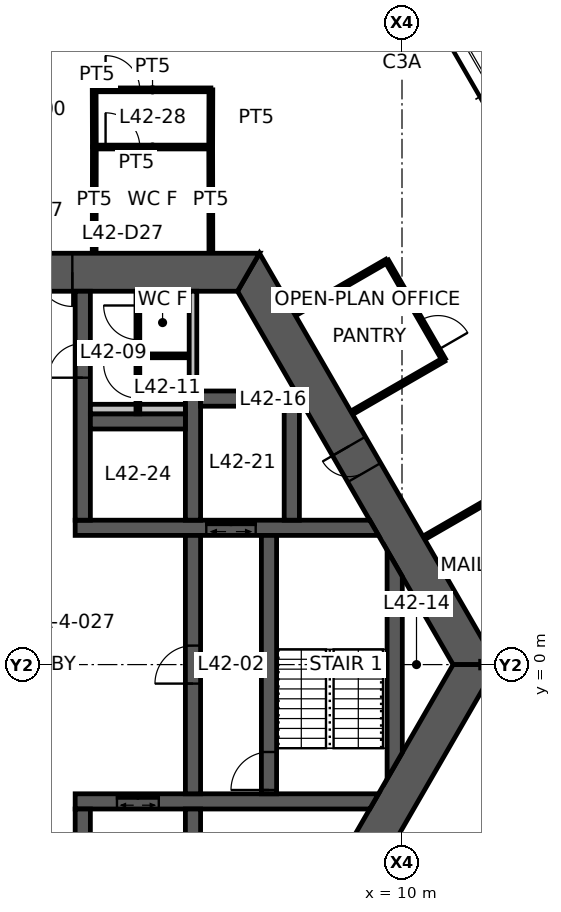
"""IFC4 building model, lengths in metres.
Left out: names, types, materials, properties, quantities, classifications, styles, units other than length and angle.
Written with IfcOpenShell. Run it as: python <this file> out.ifc"""

import sys

from ifc_helpers import new_model, si_unit, direction, frame, frame_2d, origin, place, context, subcontext, project, spatial, polyline, rectangle, outline, extrude, element, fill, save


model = new_model("IFC4")
c1 = context("Model", 3, precision=1e-05, world=origin(), true_north=direction((0.0, 1.0)))
c2 = subcontext(c1, "Body", "Model", "MODEL_VIEW")
j1 = project(units=[si_unit("LENGTHUNIT", "METRE"), si_unit("PLANEANGLEUNIT", "RADIAN")], contexts=[c1])
p1 = place(None, origin())
s1 = spatial("IfcSite", under=j1, at=p1, CompositionType="ELEMENT")
p2 = place(p1, origin())
s2 = spatial("IfcBuilding", under=s1, at=p2, CompositionType="ELEMENT")
p3 = place(p2, frame((0.0, 0.0, 168.2)))
s3 = spatial("IfcBuildingStorey", under=s2, at=p3, CompositionType="ELEMENT", Elevation=168.2)
p4 = place(p3, frame((11.922, 0.0, 0.0), z_axis=(0.0, 0.0, 1.0), x_axis=(-0.500004296715, 0.866022923061, 0.0)))
e1 = element("IfcWall", 1, at=p4, inside=s3, PredefinedType="SHEAR", context=c2, shape_type="SweptSolid", body=[
    extrude(outline(polyline([(-0.289, -0.5), (5.835, -0.5), (6.635, -0.5), (12.211, -0.5), (11.634, 0.5), (6.635, 0.5), (5.835, 0.5), (0.289, 0.5), (-0.289, -0.5)])), origin(), (0.0, 0.0, 1.0), 3.9),
])
p5 = place(p4, frame((5.835, 0.0, 0.0)))
e2 = element("IfcOpeningElement", 2, at=p5, cuts=e1, PredefinedType="OPENING", context=c2, shape_type="SweptSolid", body=[
    extrude(rectangle(XDim=0.8, YDim=2.1, at=frame_2d((0.4, 1.05))), frame((0.0, 0.51, 0.0), z_axis=(0.0, -1.0, 0.0), x_axis=(1.0, 0.0, 0.0)), (0.0, 0.0, 1.0), 1.02),
])
p6 = place(p3, frame((5.961, 10.325, 0.0), z_axis=(0.0, 0.0, 1.0), x_axis=(-1.0, 0.0, 0.0)))
e3 = element("IfcWall", 3, at=p6, inside=s3, PredefinedType="SHEAR", context=c2, shape_type="SweptSolid", body=[
    extrude(outline(polyline([(-0.289, -0.5), (4.636, -0.5), (5.536, -0.5), (6.386, -0.5), (7.286, -0.5), (12.211, -0.5), (11.634, 0.5), (7.286, 0.5), (6.386, 0.5), (5.536, 0.5), (4.636, 0.5), (0.289, 0.5), (-0.289, -0.5)])), origin(), (0.0, 0.0, 1.0), 3.9),
])
p7 = place(p6, frame((6.386, 0.0, 0.0)))
e4 = element("IfcOpeningElement", 4, at=p7, cuts=e3, PredefinedType="OPENING", context=c2, shape_type="SweptSolid", body=[
    extrude(rectangle(XDim=0.9, YDim=2.1, at=frame_2d((0.45, 1.05))), frame((0.0, 0.51, 0.0), z_axis=(0.0, -1.0, 0.0), x_axis=(1.0, 0.0, 0.0)), (0.0, 0.0, 1.0), 1.02),
])
p8 = place(p6, frame((4.636, 0.0, 0.0)))
e5 = element("IfcOpeningElement", 5, at=p8, cuts=e3, PredefinedType="OPENING", context=c2, shape_type="SweptSolid", body=[
    extrude(rectangle(XDim=0.9, YDim=2.1, at=frame_2d((0.45, 1.05))), frame((0.0, 0.51, 0.0), z_axis=(0.0, -1.0, 0.0), x_axis=(1.0, 0.0, 0.0)), (0.0, 0.0, 1.0), 1.02),
])
p9 = place(p3, frame((5.961, -10.325, 0.0), z_axis=(0.0, 0.0, 1.0), x_axis=(0.500004296715, 0.866022923061, 0.0)))
e6 = element("IfcWall", 6, at=p9, inside=s3, PredefinedType="SHEAR", context=c2, shape_type="SweptSolid", body=[
    extrude(outline(polyline([(-0.289, -0.5), (4.594, -0.5), (5.394, -0.5), (12.211, -0.5), (11.634, 0.5), (5.394, 0.5), (4.594, 0.5), (0.289, 0.5), (-0.289, -0.5)])), origin(), (0.0, 0.0, 1.0), 3.9),
])
p10 = place(p9, frame((4.594, 0.0, 0.0)))
e7 = element("IfcOpeningElement", 7, at=p10, cuts=e6, PredefinedType="OPENING", context=c2, shape_type="SweptSolid", body=[
    extrude(rectangle(XDim=0.8, YDim=2.1, at=frame_2d((0.4, 1.05))), frame((0.0, 0.51, 0.0), z_axis=(0.0, -1.0, 0.0), x_axis=(1.0, 0.0, 0.0)), (0.0, 0.0, 1.0), 1.02),
])
p11 = place(p3, frame((1.4, 3.6, 0.0), z_axis=(0.0, 0.0, 1.0), x_axis=(1.0, 0.0, 0.0)))
e8 = element("IfcWall", 8, at=p11, inside=s3, PredefinedType="SHEAR", context=c2, shape_type="SweptSolid", body=[
    extrude(outline(polyline([(0.0, -0.2), (3.45, -0.2), (4.75, -0.2), (7.982, -0.2), (7.751, 0.2), (4.75, 0.2), (3.45, 0.2), (0.0, 0.2), (0.0, -0.2)])), origin(), (0.0, 0.0, 1.0), 3.9),
])
p12 = place(p11, frame((3.45, 0.0, 0.0)))
e9 = element("IfcOpeningElement", 9, at=p12, cuts=e8, PredefinedType="OPENING", context=c2, shape_type="SweptSolid", body=[
    extrude(rectangle(XDim=1.3, YDim=2.1, at=frame_2d((0.65, 1.05))), frame((0.0, 0.21, 0.0), z_axis=(0.0, -1.0, 0.0), x_axis=(1.0, 0.0, 0.0)), (0.0, 0.0, 1.0), 0.42),
])
p13 = place(p3, frame((1.4, -3.6, 0.0), z_axis=(0.0, 0.0, 1.0), x_axis=(1.0, 0.0, 0.0)))
e10 = element("IfcWall", 10, at=p13, inside=s3, PredefinedType="SHEAR", context=c2, shape_type="SweptSolid", body=[
    extrude(outline(polyline([(0.0, -0.2), (1.1, -0.2), (2.2, -0.2), (7.751, -0.2), (7.982, 0.2), (2.2, 0.2), (1.1, 0.2), (0.0, 0.2), (0.0, -0.2)])), origin(), (0.0, 0.0, 1.0), 3.9),
])
p14 = place(p13, frame((1.1, 0.0, 0.0)))
e11 = element("IfcOpeningElement", 11, at=p14, cuts=e10, PredefinedType="OPENING", context=c2, shape_type="SweptSolid", body=[
    extrude(rectangle(XDim=1.1, YDim=2.1, at=frame_2d((0.55, 1.05))), frame((0.0, 0.21, 0.0), z_axis=(0.0, -1.0, 0.0), x_axis=(1.0, 0.0, 0.0)), (0.0, 0.0, 1.0), 0.42),
])
p15 = place(p3, frame((1.6, 3.8, 0.0), z_axis=(0.0, 0.0, 1.0), x_axis=(0.0, 1.0, 0.0)))
e12 = element("IfcWall", 12, at=p15, inside=s3, PredefinedType="SHEAR", context=c2, shape_type="SweptSolid", body=[
    extrude(rectangle(XDim=6.025, YDim=0.4, at=frame_2d((3.012, 0.0))), origin(), (0.0, 0.0, 1.0), 3.9),
])
p16 = place(p15, frame((3.75, 0.0, 0.0)))
e13 = element("IfcOpeningElement", 13, at=p16, cuts=e12, PredefinedType="OPENING", context=c2, shape_type="SweptSolid", body=[
    extrude(rectangle(XDim=0.9, YDim=2.1, at=frame_2d((0.45, 1.05))), frame((0.0, 0.21, 0.0), z_axis=(0.0, -1.0, 0.0), x_axis=(1.0, 0.0, 0.0)), (0.0, 0.0, 1.0), 0.42),
])
p17 = place(p3, frame((1.6, -3.8, 0.0), z_axis=(0.0, 0.0, 1.0), x_axis=(0.0, -1.0, 0.0)))
e14 = element("IfcWall", 14, at=p17, inside=s3, PredefinedType="SHEAR", context=c2, shape_type="SweptSolid", body=[
    extrude(rectangle(XDim=6.025, YDim=0.4, at=frame_2d((3.012, 0.0))), origin(), (0.0, 0.0, 1.0), 3.9),
])
p18 = place(p17, frame((3.6, 0.0, 0.0)))
e15 = element("IfcOpeningElement", 15, at=p18, cuts=e14, PredefinedType="OPENING", context=c2, shape_type="SweptSolid", body=[
    extrude(rectangle(XDim=1.2, YDim=2.1, at=frame_2d((0.6, 1.05))), frame((0.0, 0.21, 0.0), z_axis=(0.0, -1.0, 0.0), x_axis=(1.0, 0.0, 0.0)), (0.0, 0.0, 1.0), 0.42),
])
p19 = place(p3, frame((4.5, -3.4, 0.0), z_axis=(0.0, 0.0, 1.0), x_axis=(0.0, 1.0, 0.0)))
e16 = element("IfcWall", 16, at=p19, inside=s3, PredefinedType="SHEAR", context=c2, shape_type="SweptSolid", body=[
    extrude(rectangle(XDim=6.8, YDim=0.4, at=frame_2d((3.4, 0.0))), origin(), (0.0, 0.0, 1.0), 3.9),
])
p20 = place(p19, frame((2.9, 0.0, 0.0)))
e17 = element("IfcOpeningElement", 17, at=p20, cuts=e16, PredefinedType="OPENING", context=c2, shape_type="SweptSolid", body=[
    extrude(rectangle(XDim=1.0, YDim=2.1, at=frame_2d((0.5, 1.05))), frame((0.0, 0.21, 0.0), z_axis=(0.0, -1.0, 0.0), x_axis=(1.0, 0.0, 0.0)), (0.0, 0.0, 1.0), 0.42),
])
p21 = place(p3, frame((6.5, -3.4, 0.0), z_axis=(0.0, 0.0, 1.0), x_axis=(0.0, 1.0, 0.0)))
e18 = element("IfcWall", 18, at=p21, inside=s3, PredefinedType="SHEAR", context=c2, shape_type="SweptSolid", body=[
    extrude(rectangle(XDim=6.8, YDim=0.4, at=frame_2d((3.4, 0.0))), origin(), (0.0, 0.0, 1.0), 3.9),
])
p22 = place(p21, frame((0.1, 0.0, 0.0)))
e19 = element("IfcOpeningElement", 19, at=p22, cuts=e18, PredefinedType="OPENING", context=c2, shape_type="SweptSolid", body=[
    extrude(rectangle(XDim=1.0, YDim=2.1, at=frame_2d((0.5, 1.05))), frame((0.0, 0.21, 0.0), z_axis=(0.0, -1.0, 0.0), x_axis=(1.0, 0.0, 0.0)), (0.0, 0.0, 1.0), 0.42),
])
p23 = place(p3, frame((4.5, 3.8, 0.0), z_axis=(0.0, 0.0, 1.0), x_axis=(0.0, 1.0, 0.0)))
e20 = element("IfcWall", 20, at=p23, inside=s3, PredefinedType="SHEAR", context=c2, shape_type="SweptSolid", body=[
    extrude(rectangle(XDim=3.4, YDim=0.4, at=frame_2d((1.7, 0.0))), origin(), (0.0, 0.0, 1.0), 3.9),
])
p24 = place(p3, frame((4.5, -3.8, 0.0), z_axis=(0.0, 0.0, 1.0), x_axis=(0.0, -1.0, 0.0)))
e21 = element("IfcWall", 21, at=p24, inside=s3, PredefinedType="SHEAR", context=c2, shape_type="SweptSolid", body=[
    extrude(rectangle(XDim=6.025, YDim=0.4, at=frame_2d((3.012, 0.0))), origin(), (0.0, 0.0, 1.0), 3.9),
])
p25 = place(p3, frame((1.8, 6.4, 0.0), z_axis=(0.0, 0.0, 1.0), x_axis=(1.0, 0.0, 0.0)))
e22 = element("IfcWall", 22, at=p25, inside=s3, PredefinedType="SHEAR", context=c2, shape_type="SweptSolid", body=[
    extrude(rectangle(XDim=2.5, YDim=0.4, at=frame_2d((1.25, 0.0))), origin(), (0.0, 0.0, 1.0), 3.9),
])
p26 = place(p3, frame((4.7, 7.0, 0.0), z_axis=(0.0, 0.0, 1.0), x_axis=(1.0, 0.0, 0.0)))
e23 = element("IfcWall", 23, at=p26, inside=s3, PredefinedType="SHEAR", context=c2, shape_type="SweptSolid", body=[
    extrude(rectangle(XDim=2.2, YDim=0.4, at=frame_2d((1.1, 0.0))), origin(), (0.0, 0.0, 1.0), 3.9),
])
p27 = place(p3, frame((7.1, 3.8, 0.0), z_axis=(0.0, 0.0, 1.0), x_axis=(0.0, 1.0, 0.0)))
e24 = element("IfcWall", 24, at=p27, inside=s3, PredefinedType="SHEAR", context=c2, shape_type="SweptSolid", body=[
    extrude(outline(polyline([(0.0, -0.2), (3.206, -0.2), (3.4, 0.0), (3.4, 0.2), (0.0, 0.2), (0.0, -0.2)])), origin(), (0.0, 0.0, 1.0), 3.9),
])
p28 = place(p3, frame((9.808, -2.662, 0.0), z_axis=(0.0, 0.0, 1.0), x_axis=(0.0, 1.0, 0.0)))
e25 = element("IfcWall", 25, at=p28, inside=s3, PredefinedType="SHEAR", context=c2, shape_type="SweptSolid", body=[
    extrude(outline(polyline([(0.346, -0.2), (4.978, -0.2), (5.671, 0.2), (-0.346, 0.2), (0.346, -0.2)])), origin(), (0.0, 0.0, 1.0), 3.9),
])
p29 = place(p3, frame((4.5, 7.2, 0.0), z_axis=(0.0, 0.0, 1.0), x_axis=(0.0, 1.0, 0.0)))
e26 = element("IfcWall", 26, at=p29, inside=s3, PredefinedType="STANDARD", context=c2, shape_type="SweptSolid", body=[
    extrude(rectangle(XDim=2.625, YDim=0.2, at=frame_2d((1.312, 0.0))), origin(), (0.0, 0.0, 1.0), 3.9),
])
p30 = place(p3, frame((1.8, 6.725, 0.0), z_axis=(0.0, 0.0, 1.0), x_axis=(1.0, 0.0, 0.0)))
e27 = element("IfcWall", 27, at=p30, inside=s3, PredefinedType="PLUMBINGWALL", context=c2, shape_type="SweptSolid", body=[
    extrude(rectangle(XDim=2.5, YDim=0.25, at=frame_2d((1.25, 0.0))), origin(), (0.0, 0.0, 1.0), 3.9),
])
p31 = place(p3, frame((3.05, 6.6, 0.0), z_axis=(0.0, 0.0, 1.0), x_axis=(0.0, 1.0, 0.0)))
e28 = element("IfcWall", 28, at=p31, inside=s3, PredefinedType="PARTITIONING", context=c2, shape_type="SweptSolid", body=[
    extrude(rectangle(XDim=3.225, YDim=0.1, at=frame_2d((1.612, 0.0))), origin(), (0.0, 0.0, 1.0), 2.95),
])
p32 = place(p31, frame((1.95, 0.0, 0.0)))
e29 = element("IfcOpeningElement", 29, at=p32, cuts=e28, PredefinedType="OPENING", context=c2, shape_type="SweptSolid", body=[
    extrude(rectangle(XDim=0.9, YDim=2.1, at=frame_2d((0.45, 1.05))), frame((0.0, 0.06, 0.0), z_axis=(0.0, -1.0, 0.0), x_axis=(1.0, 0.0, 0.0)), (0.0, 0.0, 1.0), 0.12),
])
p33 = place(p31, frame((0.413, 0.0, 0.0)))
e30 = element("IfcOpeningElement", 30, at=p33, cuts=e28, PredefinedType="OPENING", context=c2, shape_type="SweptSolid", body=[
    extrude(rectangle(XDim=0.9, YDim=2.1, at=frame_2d((0.45, 1.05))), frame((0.0, 0.06, 0.0), z_axis=(0.0, -1.0, 0.0), x_axis=(1.0, 0.0, 0.0)), (0.0, 0.0, 1.0), 0.12),
])
p34 = place(p3, frame((3.1, 8.125, 0.0), z_axis=(0.0, 0.0, 1.0), x_axis=(1.0, 0.0, 0.0)))
e31 = element("IfcWall", 31, at=p34, inside=s3, PredefinedType="PARTITIONING", context=c2, shape_type="SweptSolid", body=[
    extrude(rectangle(XDim=1.2, YDim=0.1, at=frame_2d((0.6, 0.0))), origin(), (0.0, 0.0, 1.0), 2.95),
])
p35 = place(p3, frame((12.07, 0.0, 0.0), z_axis=(0.0, 0.0, 1.0), x_axis=(1.0, 0.0, 0.0)))
e32 = element("IfcWall", 32, at=p35, inside=s3, PredefinedType="PARTITIONING", context=c2, shape_type="SweptSolid", body=[
    extrude(rectangle(XDim=7.93, YDim=0.175, at=frame_2d((3.965, 0.0))), origin(), (0.0, 0.0, 1.0), 3.05),
])
p36 = place(p35, frame((1.13, 0.0, 0.0)))
e33 = element("IfcOpeningElement", 33, at=p36, cuts=e32, PredefinedType="OPENING", context=c2, shape_type="SweptSolid", body=[
    extrude(rectangle(XDim=1.0, YDim=2.1, at=frame_2d((0.5, 1.05))), frame((0.0, 0.098, 0.0), z_axis=(0.0, -1.0, 0.0), x_axis=(1.0, 0.0, 0.0)), (0.0, 0.0, 1.0), 0.195),
])
p37 = place(p3, frame((1.9, 13.62, 0.0), z_axis=(0.0, 0.0, 1.0), x_axis=(1.0, 0.0, 0.0)))
e34 = element("IfcWall", 34, at=p37, inside=s3, PredefinedType="PARTITIONING", context=c2, shape_type="SweptSolid", body=[
    extrude(rectangle(XDim=3.071, YDim=0.1, at=frame_2d((1.536, 0.0))), origin(), (0.0, 0.0, 1.0), 2.95),
])
p38 = place(p37, frame((0.3, 0.0, 0.0)))
e35 = element("IfcOpeningElement", 35, at=p38, cuts=e34, PredefinedType="OPENING", context=c2, shape_type="SweptSolid", body=[
    extrude(rectangle(XDim=0.9, YDim=2.1, at=frame_2d((0.45, 1.05))), frame((0.0, 0.06, 0.0), z_axis=(0.0, -1.0, 0.0), x_axis=(1.0, 0.0, 0.0)), (0.0, 0.0, 1.0), 0.12),
])
for number, where, z_axis, x_axis in (
    (36, (1.9, 10.845, 0.0), (0.0, 0.0, 1.0), (0.002, 1.0, 0.0)),
    (37, (4.966, 13.625, 0.0), (0.0, 0.0, 1.0), (0.002, -1.0, 0.0)),
):
    element("IfcWall", number, at=place(p3, frame(where, z_axis=z_axis, x_axis=x_axis)), inside=s3, PredefinedType="PARTITIONING", context=c2, shape_type="SweptSolid", body=[
        extrude(rectangle(XDim=2.78, YDim=0.1, at=frame_2d((1.39, 0.0))), origin(), (0.0, 0.0, 1.0), 2.95),
    ])
p39 = place(p3, frame((1.9, 15.125, 0.0), z_axis=(0.0, 0.0, 1.0), x_axis=(1.0, 0.0, 0.0)))
e38 = element("IfcWall", 38, at=p39, inside=s3, PredefinedType="PARTITIONING", context=c2, shape_type="SweptSolid", body=[
    extrude(rectangle(XDim=3.071, YDim=0.1, at=frame_2d((1.536, 0.0))), origin(), (0.0, 0.0, 1.0), 2.95),
])
p40 = place(p39, frame((0.3, 0.0, 0.0)))
e39 = element("IfcOpeningElement", 39, at=p40, cuts=e38, PredefinedType="OPENING", context=c2, shape_type="SweptSolid", body=[
    extrude(rectangle(XDim=0.9, YDim=2.1, at=frame_2d((0.45, 1.05))), frame((0.0, 0.06, 0.0), z_axis=(0.0, -1.0, 0.0), x_axis=(1.0, 0.0, 0.0)), (0.0, 0.0, 1.0), 0.12),
])
for number, where, z_axis, x_axis in (
    (40, (1.905, 13.625, 0.0), (0.0, 0.0, 1.0), (-0.003, 1.0, 0.0)),
    (41, (4.971, 15.125, 0.0), (0.0, 0.0, 1.0), (-0.003, -1.0, 0.0)),
):
    element("IfcWall", number, at=place(p3, frame(where, z_axis=z_axis, x_axis=x_axis)), inside=s3, PredefinedType="PARTITIONING", context=c2, shape_type="SweptSolid", body=[
        extrude(rectangle(XDim=1.5, YDim=0.1, at=frame_2d((0.75, 0.0))), origin(), (0.0, 0.0, 1.0), 2.95),
    ])
p41 = place(p3, frame((7.192, 9.233, 0.0), z_axis=(0.0, 0.0, 1.0), x_axis=(0.866018876994, 0.500011304563, 0.0)))
e42 = element("IfcWall", 42, at=p41, inside=s3, PredefinedType="PARTITIONING", context=c2, shape_type="SweptSolid", body=[
    extrude(rectangle(XDim=2.78, YDim=0.1, at=frame_2d((1.39, 0.0))), origin(), (0.0, 0.0, 1.0), 2.95),
])
p42 = place(p3, frame((9.6, 10.623, 0.0), z_axis=(0.0, 0.0, 1.0), x_axis=(0.499990139034, -0.866031096941, 0.0)))
e43 = element("IfcWall", 43, at=p42, inside=s3, PredefinedType="PARTITIONING", context=c2, shape_type="SweptSolid", body=[
    extrude(rectangle(XDim=3.0, YDim=0.1, at=frame_2d((1.5, 0.0))), origin(), (0.0, 0.0, 1.0), 2.95),
])
p43 = place(p42, frame((1.8, 0.0, 0.0)))
e44 = element("IfcOpeningElement", 44, at=p43, cuts=e43, PredefinedType="OPENING", context=c2, shape_type="SweptSolid", body=[
    extrude(rectangle(XDim=0.9, YDim=2.1, at=frame_2d((0.45, 1.05))), frame((0.0, 0.06, 0.0), z_axis=(0.0, -1.0, 0.0), x_axis=(1.0, 0.0, 0.0)), (0.0, 0.0, 1.0), 0.12),
])
p44 = place(p3, frame((11.1, 8.025, 0.0), z_axis=(0.0, 0.0, 1.0), x_axis=(-0.866056901187, -0.49994544093, 0.0)))
e45 = element("IfcWall", 45, at=p44, inside=s3, PredefinedType="PARTITIONING", context=c2, shape_type="SweptSolid", body=[
    extrude(rectangle(XDim=2.78, YDim=0.1, at=frame_2d((1.39, 0.0))), origin(), (0.0, 0.0, 1.0), 2.95),
])
p45 = place(p3, frame((10.592, 3.344, 0.0), z_axis=(0.0, 0.0, 1.0), x_axis=(0.866021702275, 0.500006411147, 0.0)))
e46 = element("IfcWall", 46, at=p45, inside=s3, PredefinedType="PARTITIONING", context=c2, shape_type="SweptSolid", body=[
    extrude(rectangle(XDim=2.58, YDim=0.1, at=frame_2d((1.29, 0.0))), origin(), (0.0, 0.0, 1.0), 2.95),
])
p46 = place(p8, origin())
e47 = element("IfcDoor", 47, at=p46, inside=s3, OperationType="SINGLE_SWING_LEFT", PredefinedType="DOOR", context=c2, shape_type="SweptSolid", body=[
    extrude(rectangle(XDim=0.9, YDim=2.1, at=frame_2d((0.45, 1.05))), frame((0.0, 0.025, 0.0), z_axis=(0.0, -1.0, 0.0), x_axis=(1.0, 0.0, 0.0)), (0.0, 0.0, 1.0), 0.05),
])
fill(e5, e47)
p47 = place(p5, origin())
e48 = element("IfcDoor", 48, at=p47, inside=s3, OperationType="SINGLE_SWING_RIGHT", PredefinedType="DOOR", context=c2, shape_type="SweptSolid", body=[
    extrude(rectangle(XDim=0.8, YDim=2.1, at=frame_2d((0.4, 1.05))), frame((0.0, 0.025, 0.0), z_axis=(0.0, -1.0, 0.0), x_axis=(1.0, 0.0, 0.0)), (0.0, 0.0, 1.0), 0.05),
])
fill(e2, e48)
p48 = place(p20, origin())
e49 = element("IfcDoor", 49, at=p48, inside=s3, OperationType="SINGLE_SWING_LEFT", PredefinedType="DOOR", context=c2, shape_type="SweptSolid", body=[
    extrude(rectangle(XDim=1.0, YDim=2.1, at=frame_2d((0.5, 1.05))), frame((0.0, 0.025, 0.0), z_axis=(0.0, -1.0, 0.0), x_axis=(1.0, 0.0, 0.0)), (0.0, 0.0, 1.0), 0.05),
])
fill(e17, e49)
p49 = place(p22, origin())
e50 = element("IfcDoor", 50, at=p49, inside=s3, OperationType="SINGLE_SWING_LEFT", PredefinedType="DOOR", context=c2, shape_type="SweptSolid", body=[
    extrude(rectangle(XDim=1.0, YDim=2.1, at=frame_2d((0.5, 1.05))), frame((0.0, 0.025, 0.0), z_axis=(0.0, -1.0, 0.0), x_axis=(1.0, 0.0, 0.0)), (0.0, 0.0, 1.0), 0.05),
])
fill(e19, e50)
p50 = place(p16, origin())
e51 = element("IfcDoor", 51, at=p50, inside=s3, OperationType="SINGLE_SWING_LEFT", PredefinedType="DOOR", context=c2, shape_type="SweptSolid", body=[
    extrude(rectangle(XDim=0.9, YDim=2.1, at=frame_2d((0.45, 1.05))), frame((0.0, 0.025, 0.0), z_axis=(0.0, -1.0, 0.0), x_axis=(1.0, 0.0, 0.0)), (0.0, 0.0, 1.0), 0.05),
])
fill(e13, e51)
p51 = place(p32, origin())
e52 = element("IfcDoor", 52, at=p51, inside=s3, OperationType="SINGLE_SWING_RIGHT", PredefinedType="DOOR", context=c2, shape_type="SweptSolid", body=[
    extrude(rectangle(XDim=0.9, YDim=2.1, at=frame_2d((0.45, 1.05))), frame((0.0, 0.025, 0.0), z_axis=(0.0, -1.0, 0.0), x_axis=(1.0, 0.0, 0.0)), (0.0, 0.0, 1.0), 0.05),
])
fill(e29, e52)
p52 = place(p33, origin())
e53 = element("IfcDoor", 53, at=p52, inside=s3, OperationType="SINGLE_SWING_RIGHT", PredefinedType="DOOR", context=c2, shape_type="SweptSolid", body=[
    extrude(rectangle(XDim=0.9, YDim=2.1, at=frame_2d((0.45, 1.05))), frame((0.0, 0.025, 0.0), z_axis=(0.0, -1.0, 0.0), x_axis=(1.0, 0.0, 0.0)), (0.0, 0.0, 1.0), 0.05),
])
fill(e30, e53)
p53 = place(p38, origin())
e54 = element("IfcDoor", 54, at=p53, inside=s3, OperationType="SINGLE_SWING_LEFT", PredefinedType="DOOR", context=c2, shape_type="SweptSolid", body=[
    extrude(rectangle(XDim=0.9, YDim=2.1, at=frame_2d((0.45, 1.05))), frame((0.0, 0.025, 0.0), z_axis=(0.0, -1.0, 0.0), x_axis=(1.0, 0.0, 0.0)), (0.0, 0.0, 1.0), 0.05),
])
fill(e35, e54)
p54 = place(p40, origin())
e55 = element("IfcDoor", 55, at=p54, inside=s3, OperationType="SINGLE_SWING_LEFT", PredefinedType="DOOR", context=c2, shape_type="SweptSolid", body=[
    extrude(rectangle(XDim=0.9, YDim=2.1, at=frame_2d((0.45, 1.05))), frame((0.0, 0.025, 0.0), z_axis=(0.0, -1.0, 0.0), x_axis=(1.0, 0.0, 0.0)), (0.0, 0.0, 1.0), 0.05),
])
fill(e39, e55)
p55 = place(p43, origin())
e56 = element("IfcDoor", 56, at=p55, inside=s3, OperationType="SINGLE_SWING_RIGHT", PredefinedType="DOOR", context=c2, shape_type="SweptSolid", body=[
    extrude(rectangle(XDim=0.9, YDim=2.1, at=frame_2d((0.45, 1.05))), frame((0.0, 0.025, 0.0), z_axis=(0.0, -1.0, 0.0), x_axis=(1.0, 0.0, 0.0)), (0.0, 0.0, 1.0), 0.05),
])
fill(e44, e56)
p56 = place(p14, origin())
e57 = element("IfcDoor", 57, at=p56, inside=s3, OperationType="DOUBLE_DOOR_SLIDING", PredefinedType="DOOR", context=c2, shape_type="SweptSolid", body=[
    extrude(rectangle(XDim=1.1, YDim=2.1, at=frame_2d((0.55, 1.05))), frame((0.0, 0.025, 0.0), z_axis=(0.0, -1.0, 0.0), x_axis=(1.0, 0.0, 0.0)), (0.0, 0.0, 1.0), 0.05),
])
fill(e11, e57)
p57 = place(p12, origin())
e58 = element("IfcDoor", 58, at=p57, inside=s3, OperationType="DOUBLE_DOOR_SLIDING", PredefinedType="DOOR", context=c2, shape_type="SweptSolid", body=[
    extrude(rectangle(XDim=1.3, YDim=2.1, at=frame_2d((0.65, 1.05))), frame((0.0, 0.025, 0.0), z_axis=(0.0, -1.0, 0.0), x_axis=(1.0, 0.0, 0.0)), (0.0, 0.0, 1.0), 0.05),
])
fill(e9, e58)
save(model, sys.argv[1])
